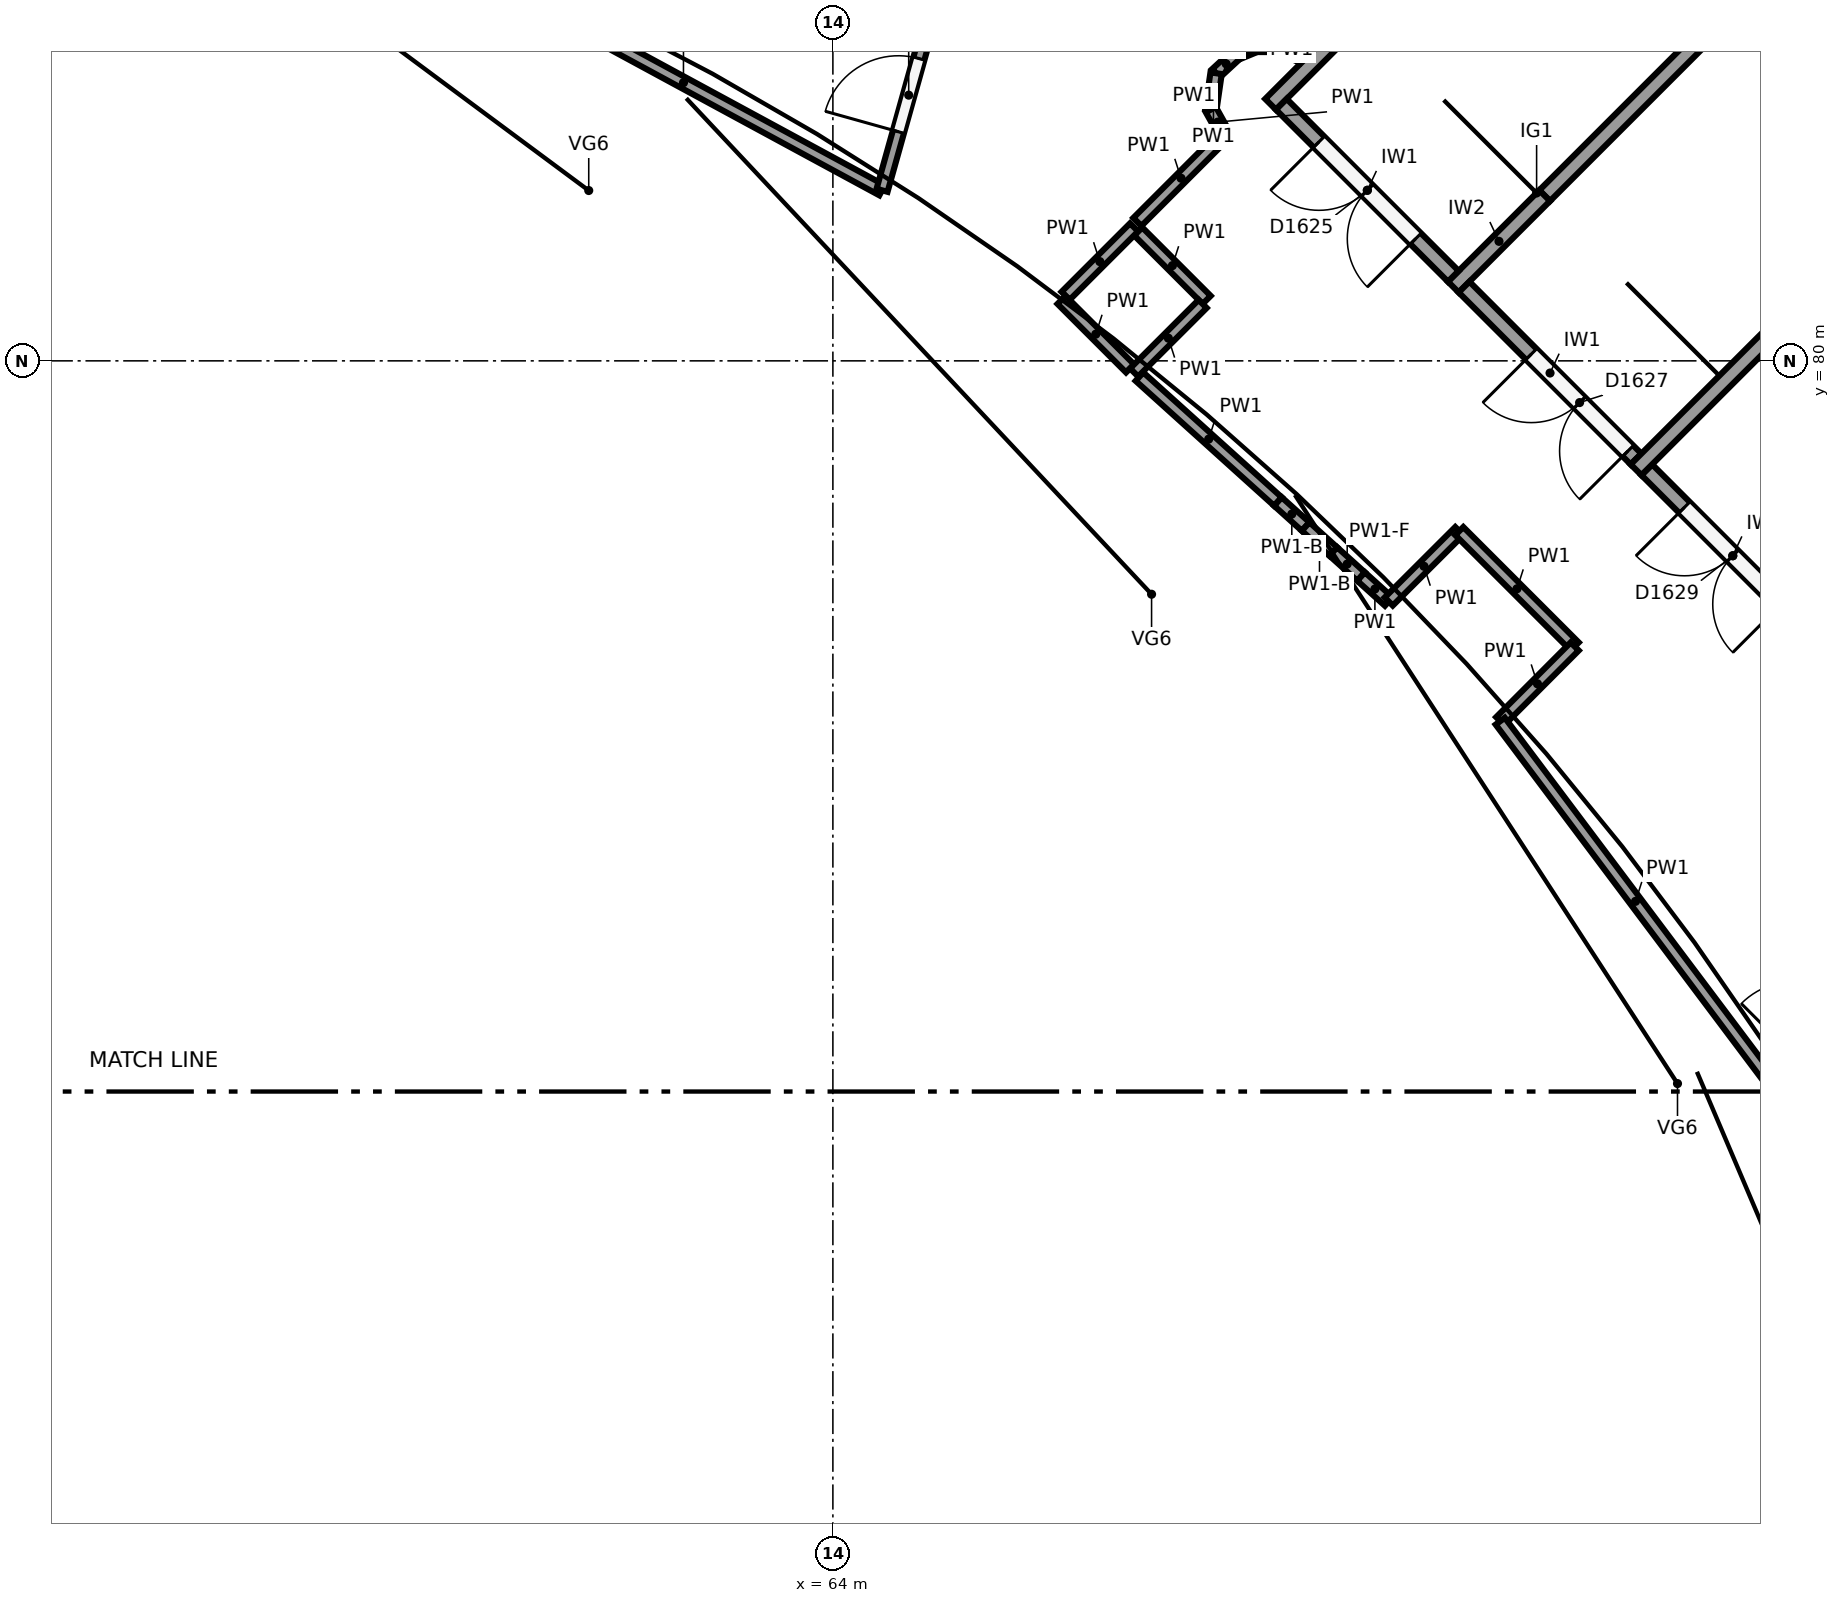
"""IFC4 building model, lengths in metres.
Left out: names, types, materials, properties, quantities, classifications, styles, units other than length and angle.
Written with IfcOpenShell. Run it as: python <this file> out.ifc"""

import sys

from ifc_helpers import new_model, si_unit, direction, frame, frame_2d, origin, origin_2d, place, context, subcontext, project, spatial, rectangle, circle, extrude, element, fill, save


model = new_model("IFC4")
c1 = context("Model", 3, precision=1e-05, world=origin(), true_north=direction((0.0, 1.0)))
c2 = subcontext(c1, "Body", "Model", "MODEL_VIEW")
j1 = project(units=[si_unit("LENGTHUNIT", "METRE"), si_unit("PLANEANGLEUNIT", "RADIAN")], contexts=[c1])
p1 = place(None, origin())
s1 = spatial("IfcSite", under=j1, at=p1, CompositionType="ELEMENT")
p2 = place(p1, origin())
s2 = spatial("IfcBuilding", under=s1, at=p2, CompositionType="ELEMENT")
p3 = place(p2, frame((0.0, 0.0, 24.0)))
s3 = spatial("IfcBuildingStorey", under=s2, at=p3, CompositionType="ELEMENT", Elevation=24.0)
p4 = place(p3, frame((71.775, 79.889, 0.0), z_axis=(0.0, 0.0, 1.0), x_axis=(1.0, 0.0, 0.0)))
e1 = element("IfcColumn", 1, at=p4, inside=s3, PredefinedType="COLUMN", context=c2, shape_type="SweptSolid", body=[
    extrude(circle(Radius=0.6, at=origin_2d()), origin(), (0.0, 0.0, 1.0), 6.0),
])
for number, where, z_axis, x_axis in (
    (2, (81.497, 85.497, 0.0), (0.0, 0.0, 1.0), (-0.707, -0.707, 0.0)),
    (3, (76.688, 90.305, 0.0), (0.0, 0.0, 1.0), (-0.707, -0.707, 0.0)),
):
    element("IfcWall", number, at=place(p3, frame(where, z_axis=z_axis, x_axis=x_axis)), inside=s3, PredefinedType="SHEAR", context=c2, shape_type="SweptSolid", body=[
        extrude(rectangle(XDim=9.8, YDim=0.2, at=frame_2d((4.9, 0.0))), origin(), (0.0, 0.0, 1.0), 5.75),
    ])
p5 = place(p3, frame((79.093, 87.901, 0.0), z_axis=(0.0, 0.0, 1.0), x_axis=(-0.707106781187, -0.707106781187, 0.0)))
e4 = element("IfcWall", 4, at=p5, inside=s3, PredefinedType="SHEAR", context=c2, shape_type="SweptSolid", body=[
    extrude(rectangle(XDim=8.1, YDim=0.2, at=frame_2d((4.05, 0.0))), origin(), (0.0, 0.0, 1.0), 5.75),
])
p6 = place(p3, frame((73.365, 82.173, 0.0), z_axis=(0.0, 0.0, 1.0), x_axis=(-0.707034968179, -0.707178586901, 0.0)))
e5 = element("IfcWall", 5, at=p6, inside=s3, PredefinedType="SHEAR", context=c2, shape_type="SweptSolid", body=[
    extrude(rectangle(XDim=1.7, YDim=0.2, at=frame_2d((0.85, 0.0))), origin(), (0.0, 0.0, 1.0), 5.75),
])
p7 = place(p3, frame((76.971, 76.304, 0.0), z_axis=(0.0, 0.0, 1.0), x_axis=(-0.707106781187, 0.707106781187, 0.0)))
e6 = element("IfcWall", 6, at=p7, inside=s3, PredefinedType="SHEAR", context=c2, shape_type="SweptSolid", body=[
    extrude(rectangle(XDim=3.2, YDim=0.2, at=frame_2d((1.6, 0.0))), origin(), (0.0, 0.0, 1.0), 5.75),
])
p8 = place(p7, frame((0.7, 0.0, 0.0)))
e7 = element("IfcOpeningElement", 7, at=p8, cuts=e6, PredefinedType="OPENING", context=c2, shape_type="SweptSolid", body=[
    extrude(rectangle(XDim=1.8, YDim=2.1, at=frame_2d((0.9, 1.05))), frame((0.0, 0.11, 0.0), z_axis=(0.0, -1.0, 0.0), x_axis=(1.0, 0.0, 0.0)), (0.0, 0.0, 1.0), 0.22),
])
p9 = place(p3, frame((74.567, 78.708, 0.0), z_axis=(0.0, 0.0, 1.0), x_axis=(-0.707106781187, 0.707106781187, 0.0)))
e8 = element("IfcWall", 8, at=p9, inside=s3, PredefinedType="SHEAR", context=c2, shape_type="SweptSolid", body=[
    extrude(rectangle(XDim=3.2, YDim=0.2, at=frame_2d((1.6, 0.0))), origin(), (0.0, 0.0, 1.0), 5.75),
])
p10 = place(p9, frame((0.15, 0.0, 0.0)))
e9 = element("IfcOpeningElement", 9, at=p10, cuts=e8, PredefinedType="OPENING", context=c2, shape_type="SweptSolid", body=[
    extrude(rectangle(XDim=1.8, YDim=2.1, at=frame_2d((0.9, 1.05))), frame((0.0, 0.11, 0.0), z_axis=(0.0, -1.0, 0.0), x_axis=(1.0, 0.0, 0.0)), (0.0, 0.0, 1.0), 0.22),
])
p11 = place(p3, frame((72.163, 81.113, 0.0), z_axis=(0.0, 0.0, 1.0), x_axis=(-0.707144925854, 0.707068634461, 0.0)))
e10 = element("IfcWall", 10, at=p11, inside=s3, PredefinedType="SHEAR", context=c2, shape_type="SweptSolid", body=[
    extrude(rectangle(XDim=3.2, YDim=0.2, at=frame_2d((1.6, 0.0))), origin(), (0.0, 0.0, 1.0), 5.75),
])
p12 = place(p11, frame((0.7, 0.0, 0.0)))
e11 = element("IfcOpeningElement", 11, at=p12, cuts=e10, PredefinedType="OPENING", context=c2, shape_type="SweptSolid", body=[
    extrude(rectangle(XDim=1.8, YDim=2.1, at=frame_2d((0.9, 1.05))), frame((0.0, 0.11, 0.0), z_axis=(0.0, -1.0, 0.0), x_axis=(1.0, 0.0, 0.0)), (0.0, 0.0, 1.0), 0.22),
])
for number, where, z_axis, x_axis in (
    (12, (68.918, 80.802, 0.0), (0.0, 0.0, 1.0), (-0.707, 0.707, 0.0)),
    (13, (67.963, 81.757, 0.0), (0.0, 0.0, 1.0), (-0.707, -0.707, 0.0)),
    (14, (67.009, 80.802, 0.0), (0.0, 0.0, 1.0), (0.707, -0.707, 0.0)),
):
    element("IfcWall", number, at=place(p3, frame(where, z_axis=z_axis, x_axis=x_axis)), inside=s3, PredefinedType="PARTITIONING", context=c2, shape_type="SweptSolid", body=[
        extrude(rectangle(XDim=1.275, YDim=0.15, at=frame_2d((0.638, 0.0))), origin(), (0.0, 0.0, 1.0), 5.4),
    ])
p13 = place(p3, frame((67.963, 79.847, 0.0), z_axis=(0.0, 0.0, 1.0), x_axis=(0.707202523759, 0.707011025648, 0.0)))
e15 = element("IfcWall", 15, at=p13, inside=s3, PredefinedType="PARTITIONING", context=c2, shape_type="SweptSolid", body=[
    extrude(rectangle(XDim=1.275, YDim=0.15, at=frame_2d((0.637, 0.0))), origin(), (0.0, 0.0, 1.0), 5.4),
])
p14 = place(p3, frame((70.176, 83.989, 0.0), z_axis=(0.0, 0.0, 1.0), x_axis=(-0.908360268621, 0.418188501026, 0.0)))
e16 = element("IfcWall", 16, at=p14, inside=s3, PredefinedType="PARTITIONING", context=c2, shape_type="SweptSolid", body=[
    extrude(rectangle(XDim=0.356, YDim=0.15, at=frame_2d((0.178, 0.0))), origin(), (0.0, 0.0, 1.0), 5.4),
])
p15 = place(p3, frame((69.568, 84.137, 0.0), z_axis=(0.0, 0.0, 1.0), x_axis=(-0.923869084389, -0.382708655389, 0.0)))
e17 = element("IfcWall", 17, at=p15, inside=s3, PredefinedType="PARTITIONING", context=c2, shape_type="SweptSolid", body=[
    extrude(rectangle(XDim=0.282, YDim=0.15, at=frame_2d((0.141, 0.0))), origin(), (0.0, 0.0, 1.0), 5.4),
])
p16 = place(p3, frame((69.307, 84.03, 0.0), z_axis=(0.0, 0.0, 1.0), x_axis=(-0.733947821225, -0.679205856658, 0.0)))
e18 = element("IfcWall", 18, at=p16, inside=s3, PredefinedType="PARTITIONING", context=c2, shape_type="SweptSolid", body=[
    extrude(rectangle(XDim=0.361, YDim=0.15, at=frame_2d((0.181, 0.0))), origin(), (0.0, 0.0, 1.0), 5.4),
])
p17 = place(p3, frame((69.042, 83.784, 0.0), z_axis=(0.0, 0.0, 1.0), x_axis=(-0.14318574461, -0.989695833345, 0.0)))
e19 = element("IfcWall", 19, at=p17, inside=s3, PredefinedType="PARTITIONING", context=c2, shape_type="SweptSolid", body=[
    extrude(rectangle(XDim=0.484, YDim=0.15, at=frame_2d((0.242, 0.0))), origin(), (0.0, 0.0, 1.0), 5.4),
])
p18 = place(p3, frame((68.973, 83.305, 0.0), z_axis=(0.0, 0.0, 1.0), x_axis=(0.487354621502, -0.873204141596, 0.0)))
e20 = element("IfcWall", 20, at=p18, inside=s3, PredefinedType="PARTITIONING", context=c2, shape_type="SweptSolid", body=[
    extrude(rectangle(XDim=0.375, YDim=0.15, at=frame_2d((0.188, 0.0))), origin(), (0.0, 0.0, 1.0), 5.4),
])
p19 = place(p3, frame((69.156, 82.977, 0.0), z_axis=(0.0, 0.0, 1.0), x_axis=(-0.707106781187, -0.707106781187, 0.0)))
e21 = element("IfcWall", 21, at=p19, inside=s3, PredefinedType="PARTITIONING", context=c2, shape_type="SweptSolid", body=[
    extrude(rectangle(XDim=1.625, YDim=0.15, at=frame_2d((0.813, 0.0))), origin(), (0.0, 0.0, 1.0), 5.4),
])
p20 = place(p3, frame((68.034, 79.792, 0.0), z_axis=(0.0, 0.0, 1.0), x_axis=(0.742586219179, -0.669750481213, 0.0)))
e22 = element("IfcWall", 22, at=p20, inside=s3, PredefinedType="PARTITIONING", context=c2, shape_type="SweptSolid", body=[
    extrude(rectangle(XDim=2.454, YDim=0.15, at=frame_2d((1.227, 0.0))), origin(), (0.0, 0.0, 1.0), 5.4),
])
p21 = place(p3, frame((69.856, 78.149, 0.0), z_axis=(0.0, 0.0, 1.0), x_axis=(0.742477572111, -0.669870924068, 0.0)))
e23 = element("IfcWall", 23, at=p21, inside=s3, PredefinedType="PARTITIONING", context=c2, shape_type="SweptSolid", body=[
    extrude(rectangle(XDim=0.491, YDim=0.15, at=frame_2d((0.246, 0.0))), origin(), (0.0, 0.0, 1.0), 2.379),
])
p22 = place(p3, frame((70.22, 77.82, 0.0), z_axis=(0.0, 0.0, 1.0), x_axis=(0.742724945946, -0.669596635796, 0.0)))
e24 = element("IfcWall", 24, at=p22, inside=s3, PredefinedType="PARTITIONING", context=c2, shape_type="SweptSolid", body=[
    extrude(rectangle(XDim=0.491, YDim=0.15, at=frame_2d((0.245, 0.0))), origin(), (0.0, 0.0, 1.0), 2.379),
])
p23 = place(p3, frame((70.585, 77.491, 0.0), z_axis=(0.0, 0.0, 1.0), x_axis=(0.742254293896, -0.670118320293, 0.0)))
e25 = element("IfcWall", 25, at=p23, inside=s3, PredefinedType="PARTITIONING", context=c2, shape_type="SweptSolid", body=[
    extrude(rectangle(XDim=0.491, YDim=0.15, at=frame_2d((0.245, 0.0))), origin(), (0.0, 0.0, 1.0), 2.474),
])
p24 = place(p3, frame((70.949, 77.162, 0.0), z_axis=(0.0, 0.0, 1.0), x_axis=(0.742724945946, -0.669596635796, 0.0)))
e26 = element("IfcWall", 26, at=p24, inside=s3, PredefinedType="PARTITIONING", context=c2, shape_type="SweptSolid", body=[
    extrude(rectangle(XDim=0.491, YDim=0.15, at=frame_2d((0.245, 0.0))), origin(), (0.0, 0.0, 1.0), 5.4),
])
p25 = place(p3, frame((71.313, 76.834, 0.0), z_axis=(0.0, 0.0, 1.0), x_axis=(0.707664949678, 0.706548171746, 0.0)))
e27 = element("IfcWall", 27, at=p25, inside=s3, PredefinedType="PARTITIONING", context=c2, shape_type="SweptSolid", body=[
    extrude(rectangle(XDim=1.312, YDim=0.15, at=frame_2d((0.656, 0.0))), origin(), (0.0, 0.0, 1.0), 5.4),
])
p26 = place(p3, frame((72.242, 77.76, 0.0), z_axis=(0.0, 0.0, 1.0), x_axis=(0.707163624852, -0.707049932951, 0.0)))
e28 = element("IfcWall", 28, at=p26, inside=s3, PredefinedType="PARTITIONING", context=c2, shape_type="SweptSolid", body=[
    extrude(rectangle(XDim=2.147, YDim=0.15, at=frame_2d((1.074, 0.0))), origin(), (0.0, 0.0, 1.0), 5.4),
])
p27 = place(p3, frame((73.76, 76.242, 0.0), z_axis=(0.0, 0.0, 1.0), x_axis=(-0.706226529773, -0.707985938168, 0.0)))
e29 = element("IfcWall", 29, at=p27, inside=s3, PredefinedType="PARTITIONING", context=c2, shape_type="SweptSolid", body=[
    extrude(rectangle(XDim=1.388, YDim=0.15, at=frame_2d((0.694, 0.0))), origin(), (0.0, 0.0, 1.0), 5.4),
])
p28 = place(p3, frame((72.78, 75.26, 0.0), z_axis=(0.0, 0.0, 1.0), x_axis=(0.600540118693, -0.799594625945, 0.0)))
e30 = element("IfcWall", 30, at=p28, inside=s3, PredefinedType="PARTITIONING", context=c2, shape_type="SweptSolid", body=[
    extrude(rectangle(XDim=5.929, YDim=0.15, at=frame_2d((2.964, 0.0))), origin(), (0.0, 0.0, 1.0), 5.4),
])
p29 = place(p3, frame((59.421, 85.075, 0.0), z_axis=(0.0, 0.0, 1.0), x_axis=(0.879221718344, -0.476412814681, 0.0)))
e31 = element("IfcWall", 31, at=p29, inside=s3, PredefinedType="PARTITIONING", context=c2, shape_type="SweptSolid", body=[
    extrude(rectangle(XDim=5.944, YDim=0.15, at=frame_2d((2.972, 0.0))), origin(), (0.0, 0.0, 1.0), 5.4),
])
p30 = place(p3, frame((64.647, 82.244, 0.0), z_axis=(0.0, 0.0, 1.0), x_axis=(0.269497535686, 0.963001079054, 0.0)))
e32 = element("IfcWall", 32, at=p30, inside=s3, PredefinedType="PARTITIONING", context=c2, shape_type="SweptSolid", body=[
    extrude(rectangle(XDim=4.72, YDim=0.15, at=frame_2d((2.36, 0.0))), origin(), (0.0, 0.0, 1.0), 5.4),
])
p31 = place(p30, frame((0.8, 0.0, 0.0)))
e33 = element("IfcOpeningElement", 33, at=p31, cuts=e32, PredefinedType="OPENING", context=c2, shape_type="SweptSolid", body=[
    extrude(rectangle(XDim=1.0, YDim=2.1, at=frame_2d((0.5, 1.05))), frame((0.0, 0.085, 0.0), z_axis=(0.0, -1.0, 0.0), x_axis=(1.0, 0.0, 0.0)), (0.0, 0.0, 1.0), 0.17),
])
p32 = place(p8, origin())
e34 = element("IfcDoor", 34, at=p32, inside=s3, OperationType="DOUBLE_DOOR_SINGLE_SWING", PredefinedType="DOOR", context=c2, shape_type="SweptSolid", body=[
    extrude(rectangle(XDim=1.8, YDim=2.1, at=frame_2d((0.9, 1.05))), frame((0.0, 0.025, 0.0), z_axis=(0.0, -1.0, 0.0), x_axis=(1.0, 0.0, 0.0)), (0.0, 0.0, 1.0), 0.05),
])
fill(e7, e34)
p33 = place(p10, origin())
e35 = element("IfcDoor", 35, at=p33, inside=s3, OperationType="DOUBLE_DOOR_SINGLE_SWING", PredefinedType="DOOR", context=c2, shape_type="SweptSolid", body=[
    extrude(rectangle(XDim=1.8, YDim=2.1, at=frame_2d((0.9, 1.05))), frame((0.0, 0.025, 0.0), z_axis=(0.0, -1.0, 0.0), x_axis=(1.0, 0.0, 0.0)), (0.0, 0.0, 1.0), 0.05),
])
fill(e9, e35)
p34 = place(p12, origin())
e36 = element("IfcDoor", 36, at=p34, inside=s3, OperationType="DOUBLE_DOOR_SINGLE_SWING", PredefinedType="DOOR", context=c2, shape_type="SweptSolid", body=[
    extrude(rectangle(XDim=1.8, YDim=2.1, at=frame_2d((0.9, 1.05))), frame((0.0, 0.025, 0.0), z_axis=(0.0, -1.0, 0.0), x_axis=(1.0, 0.0, 0.0)), (0.0, 0.0, 1.0), 0.05),
])
fill(e11, e36)
p35 = place(p31, origin())
e37 = element("IfcDoor", 37, at=p35, inside=s3, OperationType="SINGLE_SWING_LEFT", PredefinedType="DOOR", context=c2, shape_type="SweptSolid", body=[
    extrude(rectangle(XDim=1.0, YDim=2.1, at=frame_2d((0.5, 1.05))), frame((0.0, 0.025, 0.0), z_axis=(0.0, -1.0, 0.0), x_axis=(1.0, 0.0, 0.0)), (0.0, 0.0, 1.0), 0.05),
])
fill(e33, e37)
save(model, sys.argv[1])
